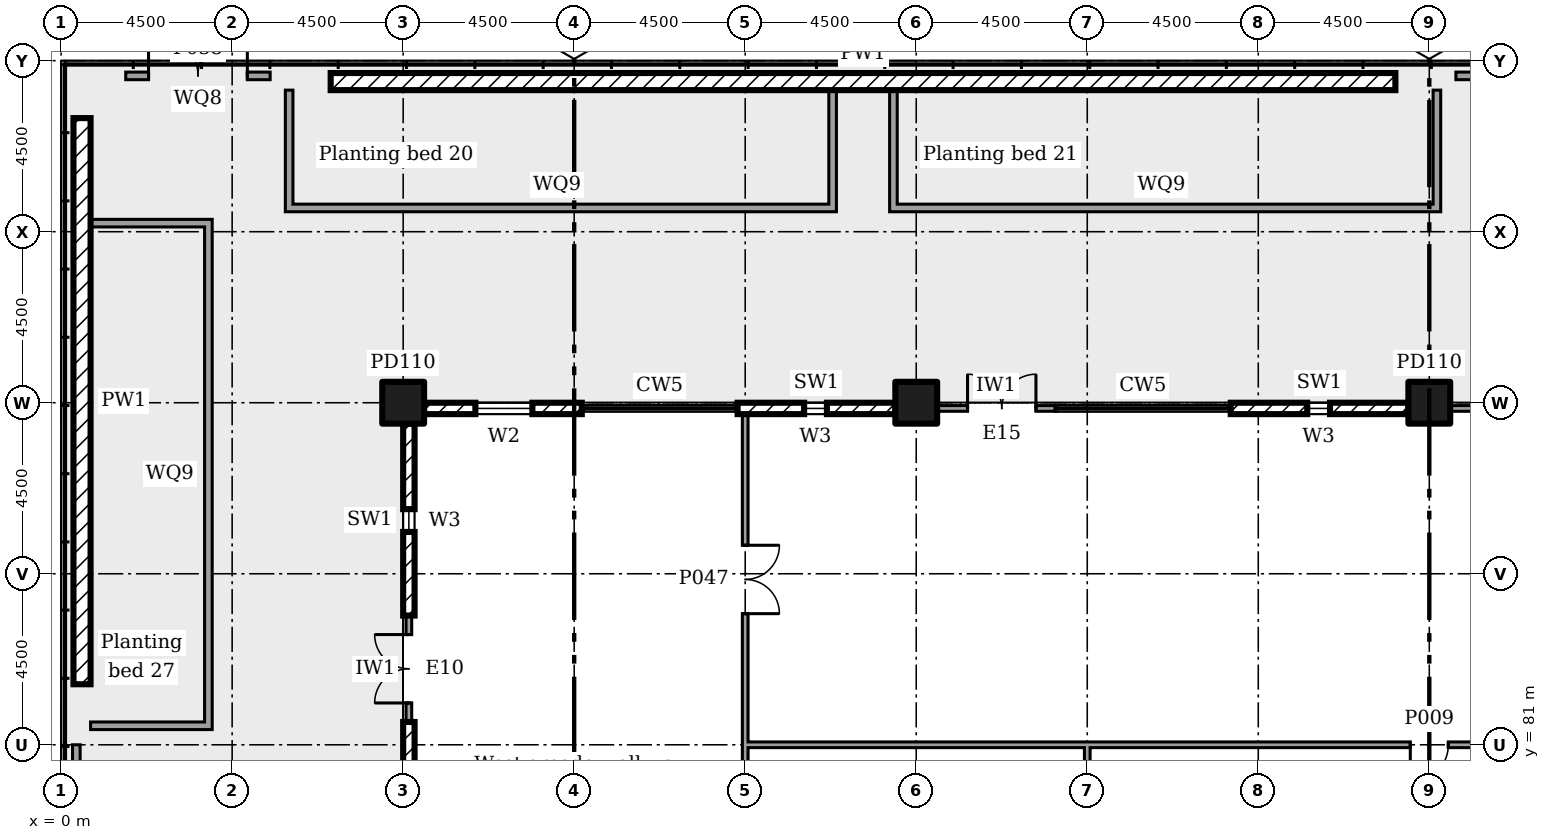
"""IFC4 building model, lengths in metres.
Left out: names, types, materials, properties, quantities, classifications, styles, units other than length and angle.
Written with IfcOpenShell. Run it as: python <this file> out.ifc"""

import sys

from ifc_helpers import new_model, si_unit, direction, frame, frame_2d, origin, origin_2d, place, context, subcontext, project, spatial, rectangle, extrude, element, fill, save


model = new_model("IFC4")
c1 = context("Model", 3, precision=1e-05, world=origin(), true_north=direction((0.0, 1.0)))
c2 = subcontext(c1, "Body", "Model", "MODEL_VIEW")
j1 = project(units=[si_unit("LENGTHUNIT", "METRE"), si_unit("PLANEANGLEUNIT", "RADIAN")], contexts=[c1])
p1 = place(None, origin())
s1 = spatial("IfcSite", under=j1, at=p1, CompositionType="ELEMENT")
p2 = place(p1, origin())
s2 = spatial("IfcBuilding", under=s1, at=p2, CompositionType="ELEMENT")
p3 = place(p2, frame((0.0, 0.0, 6.0)))
s3 = spatial("IfcBuildingStorey", under=s2, at=p3, CompositionType="ELEMENT", Elevation=6.0)
for number, where in (
    (1, (9.0, 90.0, 0.0)),
    (2, (22.5, 90.0, 0.0)),
    (3, (36.0, 90.0, 0.0)),
):
    element("IfcColumn", number, at=place(p3, frame(where)), inside=s3, PredefinedType="COLUMN", context=c2, shape_type="SweptSolid", body=[
        extrude(rectangle(XDim=1.1, YDim=1.1, at=origin_2d()), origin(), (0.0, 0.0, 1.0), 5.5),
    ])
p4 = place(p3, frame((39.65, 89.85, 0.0), z_axis=(0.0, 0.0, 1.0), x_axis=(-1.0, 0.0, 0.0)))
e4 = element("IfcWall", 4, at=p4, inside=s3, PredefinedType="SOLIDWALL", context=c2, shape_type="SweptSolid", body=[
    extrude(rectangle(XDim=3.1, YDim=0.15, at=frame_2d((1.55, 0.0))), origin(), (0.0, 0.0, 1.0), 5.05),
])
p5 = place(p4, frame((0.5, 0.0, 0.0)))
e5 = element("IfcOpeningElement", 5, at=p5, cuts=e4, PredefinedType="OPENING", context=c2, shape_type="SweptSolid", body=[
    extrude(rectangle(XDim=1.8, YDim=2.4, at=frame_2d((0.9, 1.2))), frame((0.0, 0.085, 0.0), z_axis=(0.0, -1.0, 0.0), x_axis=(1.0, 0.0, 0.0)), (0.0, 0.0, 1.0), 0.17),
])
p6 = place(p3, frame((35.45, 89.85, 0.0), z_axis=(0.0, 0.0, 1.0), x_axis=(-1.0, 0.0, 0.0)))
e6 = element("IfcWall", 6, at=p6, inside=s3, PredefinedType="ELEMENTEDWALL", context=c2, shape_type="SweptSolid", body=[
    extrude(rectangle(XDim=4.675, YDim=0.3, at=frame_2d((2.337, 0.0))), origin(), (0.0, 0.0, 1.0), 5.05),
])
p7 = place(p6, frame((2.062, 0.0, 0.45)))
e7 = element("IfcOpeningElement", 7, at=p7, cuts=e6, PredefinedType="OPENING", context=c2, shape_type="SweptSolid", body=[
    extrude(rectangle(XDim=0.6, YDim=2.4, at=frame_2d((0.3, 1.2))), frame((0.0, 0.16, 0.0), z_axis=(0.0, -1.0, 0.0), x_axis=(1.0, 0.0, 0.0)), (0.0, 0.0, 1.0), 0.32),
])
p8 = place(p3, frame((26.15, 89.85, 0.0), z_axis=(0.0, 0.0, 1.0), x_axis=(-1.0, 0.0, 0.0)))
e8 = element("IfcWall", 8, at=p8, inside=s3, PredefinedType="SOLIDWALL", context=c2, shape_type="SweptSolid", body=[
    extrude(rectangle(XDim=3.1, YDim=0.15, at=frame_2d((1.55, 0.0))), origin(), (0.0, 0.0, 1.0), 5.05),
])
p9 = place(p8, frame((0.5, 0.0, 0.0)))
e9 = element("IfcOpeningElement", 9, at=p9, cuts=e8, PredefinedType="OPENING", context=c2, shape_type="SweptSolid", body=[
    extrude(rectangle(XDim=1.8, YDim=2.4, at=frame_2d((0.9, 1.2))), frame((0.0, 0.085, 0.0), z_axis=(0.0, -1.0, 0.0), x_axis=(1.0, 0.0, 0.0)), (0.0, 0.0, 1.0), 0.17),
])
p10 = place(p3, frame((21.95, 89.85, 0.0), z_axis=(0.0, 0.0, 1.0), x_axis=(-1.0, 0.0, 0.0)))
e10 = element("IfcWall", 10, at=p10, inside=s3, PredefinedType="ELEMENTEDWALL", context=c2, shape_type="SweptSolid", body=[
    extrude(rectangle(XDim=4.15, YDim=0.3, at=frame_2d((2.075, 0.0))), origin(), (0.0, 0.0, 1.0), 5.05),
])
p11 = place(p10, frame((1.8, 0.0, 0.45)))
e11 = element("IfcOpeningElement", 11, at=p11, cuts=e10, PredefinedType="OPENING", context=c2, shape_type="SweptSolid", body=[
    extrude(rectangle(XDim=0.6, YDim=2.4, at=frame_2d((0.3, 1.2))), frame((0.0, 0.16, 0.0), z_axis=(0.0, -1.0, 0.0), x_axis=(1.0, 0.0, 0.0)), (0.0, 0.0, 1.0), 0.32),
])
p12 = place(p3, frame((13.7, 89.85, 0.0), z_axis=(0.0, 0.0, 1.0), x_axis=(-1.0, 0.0, 0.0)))
e12 = element("IfcWall", 12, at=p12, inside=s3, PredefinedType="ELEMENTEDWALL", context=c2, shape_type="SweptSolid", body=[
    extrude(rectangle(XDim=4.15, YDim=0.3, at=frame_2d((2.075, 0.0))), origin(), (0.0, 0.0, 1.0), 5.05),
])
p13 = place(p12, frame((1.3, 0.0, 0.9)))
e13 = element("IfcOpeningElement", 13, at=p13, cuts=e12, PredefinedType="OPENING", context=c2, shape_type="SweptSolid", body=[
    extrude(rectangle(XDim=1.5, YDim=1.8, at=frame_2d((0.75, 0.9))), frame((0.0, 0.16, 0.0), z_axis=(0.0, -1.0, 0.0), x_axis=(1.0, 0.0, 0.0)), (0.0, 0.0, 1.0), 0.32),
])
p14 = place(p3, frame((9.15, 89.45, 0.0), z_axis=(0.0, 0.0, 1.0), x_axis=(0.0, -1.0, 0.0)))
e14 = element("IfcWall", 14, at=p14, inside=s3, PredefinedType="ELEMENTEDWALL", context=c2, shape_type="SweptSolid", body=[
    extrude(rectangle(XDim=5.05, YDim=0.3, at=frame_2d((2.525, 0.0))), origin(), (0.0, 0.0, 1.0), 5.05),
])
p15 = place(p14, frame((2.25, 0.0, 0.45)))
e15 = element("IfcOpeningElement", 15, at=p15, cuts=e14, PredefinedType="OPENING", context=c2, shape_type="SweptSolid", body=[
    extrude(rectangle(XDim=0.6, YDim=2.4, at=frame_2d((0.3, 1.2))), frame((0.0, 0.16, 0.0), z_axis=(0.0, -1.0, 0.0), x_axis=(1.0, 0.0, 0.0)), (0.0, 0.0, 1.0), 0.32),
])
p16 = place(p3, frame((9.15, 84.4, 0.0), z_axis=(0.0, 0.0, 1.0), x_axis=(0.0, -1.0, 0.0)))
e16 = element("IfcWall", 16, at=p16, inside=s3, PredefinedType="SOLIDWALL", context=c2, shape_type="SweptSolid", body=[
    extrude(rectangle(XDim=2.8, YDim=0.15, at=frame_2d((1.4, 0.0))), origin(), (0.0, 0.0, 1.0), 5.05),
])
p17 = place(p16, frame((0.5, 0.0, 0.0)))
e17 = element("IfcOpeningElement", 17, at=p17, cuts=e16, PredefinedType="OPENING", context=c2, shape_type="SweptSolid", body=[
    extrude(rectangle(XDim=1.8, YDim=2.4, at=frame_2d((0.9, 1.2))), frame((0.0, 0.085, 0.0), z_axis=(0.0, -1.0, 0.0), x_axis=(1.0, 0.0, 0.0)), (0.0, 0.0, 1.0), 0.17),
])
p18 = place(p3, frame((9.15, 81.6, 0.0), z_axis=(0.0, 0.0, 1.0), x_axis=(0.0, -1.0, 0.0)))
e18 = element("IfcWall", 18, at=p18, inside=s3, PredefinedType="ELEMENTEDWALL", context=c2, shape_type="SweptSolid", body=[
    extrude(rectangle(XDim=4.55, YDim=0.3, at=frame_2d((2.275, 0.0))), origin(), (0.0, 0.0, 1.0), 5.05),
])
p19 = place(p18, frame((1.95, 0.0, 0.45)))
e19 = element("IfcOpeningElement", 19, at=p19, cuts=e18, PredefinedType="OPENING", context=c2, shape_type="SweptSolid", body=[
    extrude(rectangle(XDim=0.6, YDim=2.4, at=frame_2d((0.3, 1.2))), frame((0.0, 0.16, 0.0), z_axis=(0.0, -1.0, 0.0), x_axis=(1.0, 0.0, 0.0)), (0.0, 0.0, 1.0), 0.32),
])
p20 = place(p3, frame((35.107, 98.45, 0.0), z_axis=(0.0, 0.0, 1.0), x_axis=(-1.0, 0.0, 0.0)))
e20 = element("IfcWall", 20, at=p20, inside=s3, PredefinedType="SOLIDWALL", context=c2, shape_type="SweptSolid", body=[
    extrude(rectangle(XDim=28.015, YDim=0.45, at=frame_2d((14.007, 0.0))), origin(), (0.0, 0.0, 1.0), 0.6),
])
p21 = place(p3, frame((0.55, 97.489, 0.0), z_axis=(0.0, 0.0, 1.0), x_axis=(0.0, -1.0, 0.0)))
e21 = element("IfcWall", 21, at=p21, inside=s3, PredefinedType="SOLIDWALL", context=c2, shape_type="SweptSolid", body=[
    extrude(rectangle(XDim=14.897, YDim=0.45, at=frame_2d((7.448, 0.0))), origin(), (0.0, 0.0, 1.0), 0.6),
])
p22 = place(p3, frame((20.3, 95.025, 0.0), z_axis=(0.0, 0.0, 1.0), x_axis=(0.0, 1.0, 0.0)))
e22 = element("IfcWall", 22, at=p22, inside=s3, PredefinedType="SOLIDWALL", context=c2, shape_type="SweptSolid", body=[
    extrude(rectangle(XDim=3.2, YDim=0.2, at=frame_2d((1.6, 0.0))), origin(), (0.0, 0.0, 1.0), 0.45),
])
p23 = place(p3, frame((5.9, 95.125, 0.0)))
e23 = element("IfcWall", 23, at=p23, inside=s3, PredefinedType="SOLIDWALL", context=c2, shape_type="SweptSolid", body=[
    extrude(rectangle(XDim=14.3, YDim=0.2, at=frame_2d((7.15, 0.0))), origin(), (0.0, 0.0, 1.0), 0.45),
])
p24 = place(p3, frame((6.0, 95.225, 0.0), z_axis=(0.0, 0.0, 1.0), x_axis=(0.0, 1.0, 0.0)))
e24 = element("IfcWall", 24, at=p24, inside=s3, PredefinedType="SOLIDWALL", context=c2, shape_type="SweptSolid", body=[
    extrude(rectangle(XDim=3.0, YDim=0.2, at=frame_2d((1.5, 0.0))), origin(), (0.0, 0.0, 1.0), 0.45),
])
p25 = place(p3, frame((36.2, 95.025, 0.0), z_axis=(0.0, 0.0, 1.0), x_axis=(0.0, 1.0, 0.0)))
e25 = element("IfcWall", 25, at=p25, inside=s3, PredefinedType="SOLIDWALL", context=c2, shape_type="SweptSolid", body=[
    extrude(rectangle(XDim=3.2, YDim=0.2, at=frame_2d((1.6, 0.0))), origin(), (0.0, 0.0, 1.0), 0.45),
])
p26 = place(p3, frame((21.8, 95.125, 0.0)))
e26 = element("IfcWall", 26, at=p26, inside=s3, PredefinedType="SOLIDWALL", context=c2, shape_type="SweptSolid", body=[
    extrude(rectangle(XDim=14.3, YDim=0.2, at=frame_2d((7.15, 0.0))), origin(), (0.0, 0.0, 1.0), 0.45),
])
p27 = place(p3, frame((21.9, 95.225, 0.0), z_axis=(0.0, 0.0, 1.0), x_axis=(0.0, 1.0, 0.0)))
e27 = element("IfcWall", 27, at=p27, inside=s3, PredefinedType="SOLIDWALL", context=c2, shape_type="SweptSolid", body=[
    extrude(rectangle(XDim=3.0, YDim=0.2, at=frame_2d((1.5, 0.0))), origin(), (0.0, 0.0, 1.0), 0.45),
])
p28 = place(p3, frame((3.875, 81.4, 0.0), z_axis=(0.0, 0.0, 1.0), x_axis=(0.0, 1.0, 0.0)))
e28 = element("IfcWall", 28, at=p28, inside=s3, PredefinedType="SOLIDWALL", context=c2, shape_type="SweptSolid", body=[
    extrude(rectangle(XDim=13.425, YDim=0.2, at=frame_2d((6.712, 0.0))), origin(), (0.0, 0.0, 1.0), 0.45),
])
for number, where in (
    (29, (0.775, 94.725, 0.0)),
    (30, (0.775, 81.5, 0.0)),
):
    element("IfcWall", number, at=place(p3, frame(where)), inside=s3, PredefinedType="SOLIDWALL", context=c2, shape_type="SweptSolid", body=[
        extrude(rectangle(XDim=3.0, YDim=0.2, at=frame_2d((1.5, 0.0))), origin(), (0.0, 0.0, 1.0), 0.45),
    ])
p29 = place(p3, frame((18.0, 80.925, 0.0), z_axis=(0.0, 0.0, 1.0), x_axis=(0.0, 1.0, 0.0)))
e31 = element("IfcWall", 31, at=p29, inside=s3, PredefinedType="PARTITIONING", context=c2, shape_type="SweptSolid", body=[
    extrude(rectangle(XDim=8.775, YDim=0.15, at=frame_2d((4.387, 0.0))), origin(), (0.0, 0.0, 1.0), 5.05),
])
p30 = place(p29, frame((3.525, 0.0, 0.0)))
e32 = element("IfcOpeningElement", 32, at=p30, cuts=e31, PredefinedType="OPENING", context=c2, shape_type="SweptSolid", body=[
    extrude(rectangle(XDim=1.8, YDim=2.1, at=frame_2d((0.9, 1.05))), frame((0.0, 0.085, 0.0), z_axis=(0.0, -1.0, 0.0), x_axis=(1.0, 0.0, 0.0)), (0.0, 0.0, 1.0), 0.17),
])
p31 = place(p3, frame((18.0, 72.0, 0.0), z_axis=(0.0, 0.0, 1.0), x_axis=(0.0, 1.0, 0.0)))
e33 = element("IfcWall", 33, at=p31, inside=s3, PredefinedType="PARTITIONING", context=c2, shape_type="SweptSolid", body=[
    extrude(rectangle(XDim=9.0, YDim=0.15, at=frame_2d((4.5, 0.0))), origin(), (0.0, 0.0, 1.0), 5.05),
])
p32 = place(p31, frame((4.0, 0.0, 0.0)))
e34 = element("IfcOpeningElement", 34, at=p32, cuts=e33, PredefinedType="OPENING", context=c2, shape_type="SweptSolid", body=[
    extrude(rectangle(XDim=1.0, YDim=2.1, at=frame_2d((0.5, 1.05))), frame((0.0, 0.085, 0.0), z_axis=(0.0, -1.0, 0.0), x_axis=(1.0, 0.0, 0.0)), (0.0, 0.0, 1.0), 0.17),
])
p33 = place(p3, frame((18.075, 81.0, 0.0)))
e35 = element("IfcWall", 35, at=p33, inside=s3, PredefinedType="PARTITIONING", context=c2, shape_type="SweptSolid", body=[
    extrude(rectangle(XDim=9.0, YDim=0.15, at=frame_2d((4.5, 0.0))), origin(), (0.0, 0.0, 1.0), 5.05),
])
p34 = place(p3, frame((27.0, 81.0, 0.0)))
e36 = element("IfcWall", 36, at=p34, inside=s3, PredefinedType="PARTITIONING", context=c2, shape_type="SweptSolid", body=[
    extrude(rectangle(XDim=18.075, YDim=0.15, at=frame_2d((9.038, 0.0))), origin(), (0.0, 0.0, 1.0), 5.05),
])
p35 = place(p34, frame((8.5, 0.0, 0.0)))
e37 = element("IfcOpeningElement", 37, at=p35, cuts=e36, PredefinedType="OPENING", context=c2, shape_type="SweptSolid", body=[
    extrude(rectangle(XDim=1.0, YDim=2.1, at=frame_2d((0.5, 1.05))), frame((0.0, 0.085, 0.0), z_axis=(0.0, -1.0, 0.0), x_axis=(1.0, 0.0, 0.0)), (0.0, 0.0, 1.0), 0.17),
])
p36 = place(p3, frame((27.0, 71.925, 0.0), z_axis=(0.0, 0.0, 1.0), x_axis=(0.0, 1.0, 0.0)))
e38 = element("IfcWall", 38, at=p36, inside=s3, PredefinedType="PARTITIONING", context=c2, shape_type="SweptSolid", body=[
    extrude(rectangle(XDim=9.0, YDim=0.15, at=frame_2d((4.5, 0.0))), origin(), (0.0, 0.0, 1.0), 5.05),
])
p37 = place(p3, frame((1.7, 98.6, 0.0)))
e39 = element("IfcWall", 39, at=p37, inside=s3, PredefinedType="SOLIDWALL", context=c2, shape_type="SweptSolid", body=[
    extrude(rectangle(XDim=3.8, YDim=0.2, at=frame_2d((1.9, 0.0))), origin(), (0.0, 0.0, 1.0), 2.3),
])
p38 = place(p37, frame((0.6, 0.0, 0.0)))
e40 = element("IfcOpeningElement", 40, at=p38, cuts=e39, PredefinedType="OPENING", context=c2, shape_type="SweptSolid", body=[
    extrude(rectangle(XDim=2.6, YDim=2.1, at=frame_2d((1.3, 1.05))), frame((0.0, 0.11, 0.0), z_axis=(0.0, -1.0, 0.0), x_axis=(1.0, 0.0, 0.0)), (0.0, 0.0, 1.0), 0.22),
])
p39 = place(p3, frame((36.7, 98.6, 0.0)))
e41 = element("IfcWall", 41, at=p39, inside=s3, PredefinedType="SOLIDWALL", context=c2, shape_type="SweptSolid", body=[
    extrude(rectangle(XDim=3.8, YDim=0.2, at=frame_2d((1.9, 0.0))), origin(), (0.0, 0.0, 1.0), 2.3),
])
p40 = place(p39, frame((0.6, 0.0, 0.0)))
e42 = element("IfcOpeningElement", 42, at=p40, cuts=e41, PredefinedType="OPENING", context=c2, shape_type="SweptSolid", body=[
    extrude(rectangle(XDim=2.6, YDim=2.1, at=frame_2d((1.3, 1.05))), frame((0.0, 0.11, 0.0), z_axis=(0.0, -1.0, 0.0), x_axis=(1.0, 0.0, 0.0)), (0.0, 0.0, 1.0), 0.22),
])
p41 = place(p3, frame((0.4, 77.2, 0.0), z_axis=(0.0, 0.0, 1.0), x_axis=(0.0, 1.0, 0.0)))
e43 = element("IfcWall", 43, at=p41, inside=s3, PredefinedType="SOLIDWALL", context=c2, shape_type="SweptSolid", body=[
    extrude(rectangle(XDim=3.8, YDim=0.2, at=frame_2d((1.9, 0.0))), origin(), (0.0, 0.0, 1.0), 2.3),
])
p42 = place(p41, frame((0.6, 0.0, 0.0)))
e44 = element("IfcOpeningElement", 44, at=p42, cuts=e43, PredefinedType="OPENING", context=c2, shape_type="SweptSolid", body=[
    extrude(rectangle(XDim=2.6, YDim=2.1, at=frame_2d((1.3, 1.05))), frame((0.0, 0.11, 0.0), z_axis=(0.0, -1.0, 0.0), x_axis=(1.0, 0.0, 0.0)), (0.0, 0.0, 1.0), 0.22),
])
p43 = place(p7, origin())
e45 = element("IfcWindow", 45, at=p43, inside=s3, PartitioningType="SINGLE_PANEL", PredefinedType="WINDOW", context=c2, shape_type="SweptSolid", body=[
    extrude(rectangle(XDim=0.6, YDim=2.4, at=frame_2d((0.3, 1.2))), frame((0.0, 0.03, 0.0), z_axis=(0.0, -1.0, 0.0), x_axis=(1.0, 0.0, 0.0)), (0.0, 0.0, 1.0), 0.06),
])
fill(e7, e45)
p44 = place(p9, frame((1.8, 0.0, 0.0), x_axis=(-1.0, 0.0, 0.0)))
e46 = element("IfcDoor", 46, at=p44, inside=s3, OperationType="DOUBLE_DOOR_DOUBLE_SWING", PredefinedType="NOTDEFINED", context=c2, shape_type="SweptSolid", body=[
    extrude(rectangle(XDim=1.8, YDim=2.4, at=frame_2d((0.9, 1.2))), frame((0.0, 0.025, 0.0), z_axis=(0.0, -1.0, 0.0), x_axis=(1.0, 0.0, 0.0)), (0.0, 0.0, 1.0), 0.05),
])
fill(e9, e46)
p45 = place(p11, origin())
e47 = element("IfcWindow", 47, at=p45, inside=s3, PartitioningType="SINGLE_PANEL", PredefinedType="WINDOW", context=c2, shape_type="SweptSolid", body=[
    extrude(rectangle(XDim=0.6, YDim=2.4, at=frame_2d((0.3, 1.2))), frame((0.0, 0.03, 0.0), z_axis=(0.0, -1.0, 0.0), x_axis=(1.0, 0.0, 0.0)), (0.0, 0.0, 1.0), 0.06),
])
fill(e11, e47)
p46 = place(p13, origin())
e48 = element("IfcWindow", 48, at=p46, inside=s3, PartitioningType="SINGLE_PANEL", PredefinedType="WINDOW", context=c2, shape_type="SweptSolid", body=[
    extrude(rectangle(XDim=1.5, YDim=1.8, at=frame_2d((0.75, 0.9))), frame((0.0, 0.03, 0.0), z_axis=(0.0, -1.0, 0.0), x_axis=(1.0, 0.0, 0.0)), (0.0, 0.0, 1.0), 0.06),
])
fill(e13, e48)
p47 = place(p15, origin())
e49 = element("IfcWindow", 49, at=p47, inside=s3, PartitioningType="SINGLE_PANEL", PredefinedType="WINDOW", context=c2, shape_type="SweptSolid", body=[
    extrude(rectangle(XDim=0.6, YDim=2.4, at=frame_2d((0.3, 1.2))), frame((0.0, 0.03, 0.0), z_axis=(0.0, -1.0, 0.0), x_axis=(1.0, 0.0, 0.0)), (0.0, 0.0, 1.0), 0.06),
])
fill(e15, e49)
p48 = place(p17, frame((1.8, 0.0, 0.0), x_axis=(-1.0, 0.0, 0.0)))
e50 = element("IfcDoor", 50, at=p48, inside=s3, OperationType="DOUBLE_DOOR_DOUBLE_SWING", PredefinedType="NOTDEFINED", context=c2, shape_type="SweptSolid", body=[
    extrude(rectangle(XDim=1.8, YDim=2.4, at=frame_2d((0.9, 1.2))), frame((0.0, 0.025, 0.0), z_axis=(0.0, -1.0, 0.0), x_axis=(1.0, 0.0, 0.0)), (0.0, 0.0, 1.0), 0.05),
])
fill(e17, e50)
p49 = place(p35, frame((1.0, 0.0, 0.0), x_axis=(-1.0, 0.0, 0.0)))
e51 = element("IfcDoor", 51, at=p49, inside=s3, OperationType="SINGLE_SWING_LEFT", PredefinedType="DOOR", context=c2, shape_type="SweptSolid", body=[
    extrude(rectangle(XDim=1.0, YDim=2.1, at=frame_2d((0.5, 1.05))), frame((0.0, 0.025, 0.0), z_axis=(0.0, -1.0, 0.0), x_axis=(1.0, 0.0, 0.0)), (0.0, 0.0, 1.0), 0.05),
])
fill(e37, e51)
p50 = place(p30, frame((1.8, 0.0, 0.0), x_axis=(-1.0, 0.0, 0.0)))
e52 = element("IfcDoor", 52, at=p50, inside=s3, OperationType="DOUBLE_DOOR_SINGLE_SWING", PredefinedType="DOOR", context=c2, shape_type="SweptSolid", body=[
    extrude(rectangle(XDim=1.8, YDim=2.1, at=frame_2d((0.9, 1.05))), frame((0.0, 0.025, 0.0), z_axis=(0.0, -1.0, 0.0), x_axis=(1.0, 0.0, 0.0)), (0.0, 0.0, 1.0), 0.05),
])
fill(e32, e52)
p51 = place(p38, origin())
e53 = element("IfcDoor", 53, at=p51, inside=s3, OperationType="DOUBLE_DOOR_SINGLE_SWING", PredefinedType="GATE", context=c2, shape_type="SweptSolid", body=[
    extrude(rectangle(XDim=2.6, YDim=2.1, at=frame_2d((1.3, 1.05))), frame((0.0, 0.025, 0.0), z_axis=(0.0, -1.0, 0.0), x_axis=(1.0, 0.0, 0.0)), (0.0, 0.0, 1.0), 0.05),
])
fill(e40, e53)
save(model, sys.argv[1])
